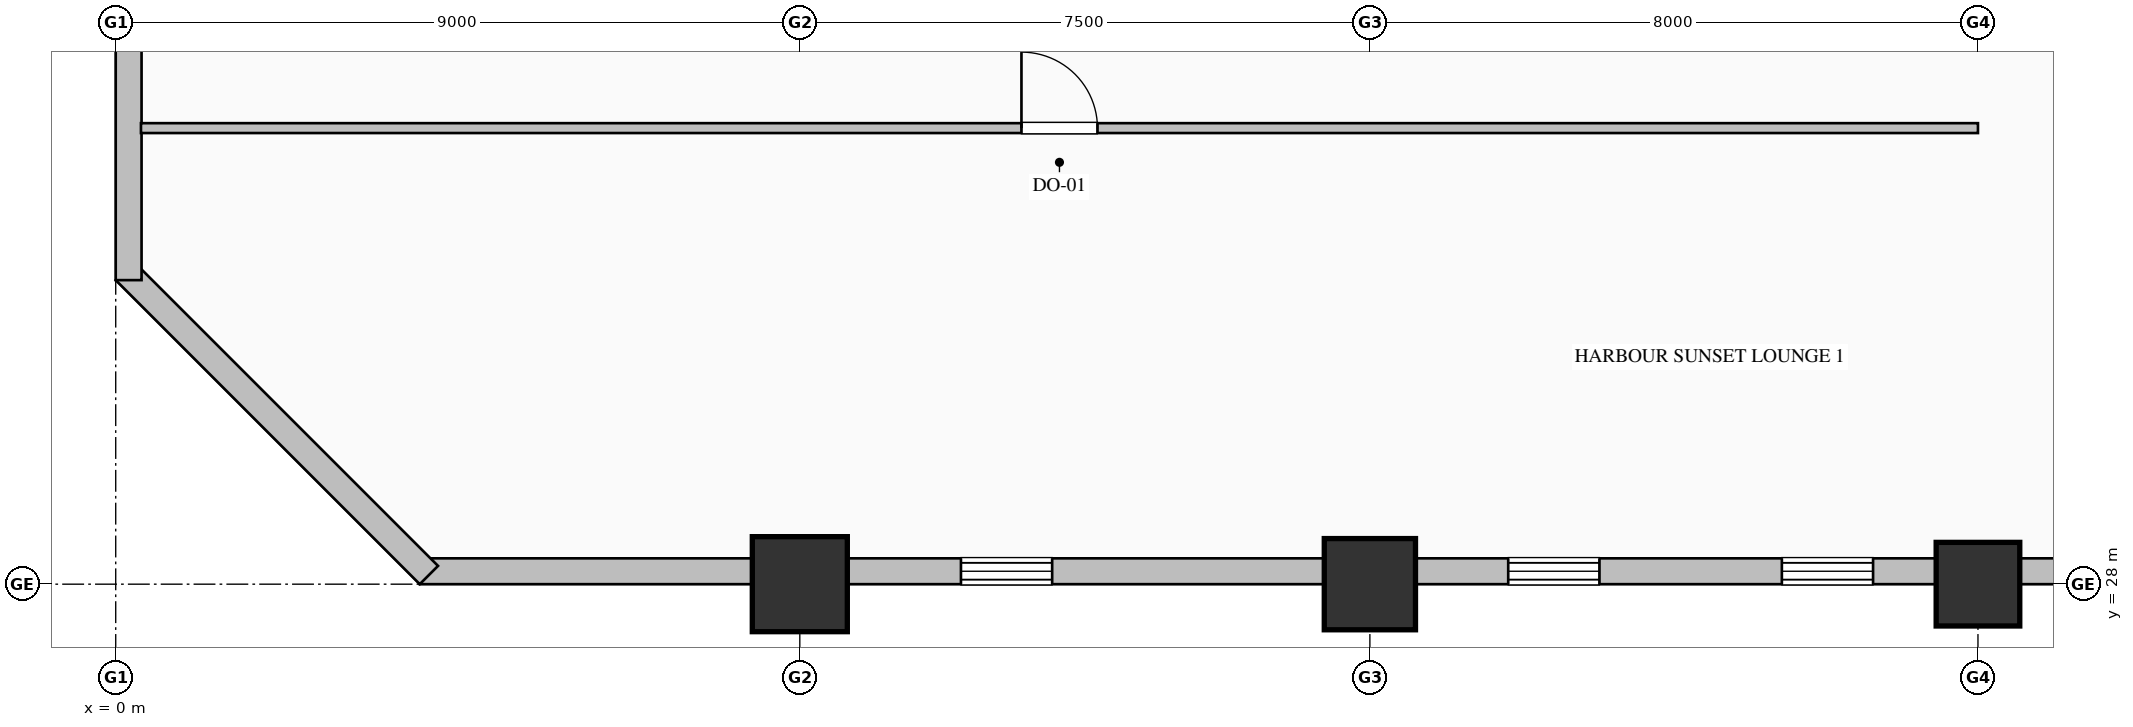
"""IFC4 building model, lengths in metres.
Left out: names, types, materials, properties, quantities, classifications, styles, units other than length and angle.
Written with IfcOpenShell. Run it as: python <this file> out.ifc"""

import sys

from ifc_helpers import new_model, si_unit, direction, frame, frame_2d, origin, origin_2d, place, context, subcontext, project, spatial, rectangle, hollow_rectangle, hollow_circle, extrude, element, fill, save


model = new_model("IFC4")
c1 = context("Model", 3, precision=1e-05, world=origin(), true_north=direction((0.0, 1.0)))
c2 = subcontext(c1, "Body", "Model", "MODEL_VIEW")
j1 = project(units=[si_unit("LENGTHUNIT", "METRE"), si_unit("PLANEANGLEUNIT", "RADIAN")], contexts=[c1])
p1 = place(None, origin())
s1 = spatial("IfcSite", under=j1, at=p1, CompositionType="ELEMENT")
p2 = place(p1, origin())
s2 = spatial("IfcBuilding", under=s1, at=p2, CompositionType="ELEMENT")
p3 = place(p2, frame((0.0, 0.0, 68.2)))
s3 = spatial("IfcBuildingStorey", under=s2, at=p3, CompositionType="ELEMENT", Elevation=68.2)
p4 = place(p3, frame((9.0, 28.0, 0.0), z_axis=(0.0, 0.0, 1.0), x_axis=(1.0, 0.0, 0.0)))
e1 = element("IfcColumn", 1, at=p4, inside=s3, PredefinedType="COLUMN", context=c2, shape_type="SweptSolid", body=[
    extrude(hollow_rectangle(XDim=1.25, YDim=1.25, WallThickness=0.045, at=origin_2d()), origin(), (0.0, 0.0, 1.0), 4.0),
])
p5 = place(p3, frame((16.5, 28.0, 0.0), z_axis=(0.0, 0.0, 1.0), x_axis=(1.0, 0.0, 0.0)))
e2 = element("IfcColumn", 2, at=p5, inside=s3, PredefinedType="COLUMN", context=c2, shape_type="SweptSolid", body=[
    extrude(hollow_circle(Radius=0.6, WallThickness=0.04, at=origin_2d()), origin(), (0.0, 0.0, 1.0), 4.0),
])
p6 = place(p3, frame((24.5, 28.0, 0.0), z_axis=(0.0, 0.0, 1.0), x_axis=(1.0, 0.0, 0.0)))
e3 = element("IfcColumn", 3, at=p6, inside=s3, PredefinedType="COLUMN", context=c2, shape_type="SweptSolid", body=[
    extrude(hollow_rectangle(XDim=1.1, YDim=1.1, WallThickness=0.04, at=origin_2d()), origin(), (0.0, 0.0, 1.0), 4.0),
])
p7 = place(p3, frame((40.52, 28.17, 0.0), z_axis=(0.0, 0.0, 1.0), x_axis=(-1.0, 0.0, 0.0)))
e4 = element("IfcWall", 4, at=p7, inside=s3, PredefinedType="SOLIDWALL", context=c2, shape_type="SweptSolid", body=[
    extrude(rectangle(XDim=36.52, YDim=0.34, at=frame_2d((18.26, 0.0))), origin(), (0.0, 0.0, 1.0), 3.05),
])
p8 = place(p7, frame((3.0, 0.0, 0.7)))
e5 = element("IfcOpeningElement", 5, at=p8, cuts=e4, PredefinedType="OPENING", context=c2, shape_type="SweptSolid", body=[
    extrude(rectangle(XDim=1.2, YDim=1.85, at=frame_2d((0.6, 0.925))), frame((0.0, 0.18, 0.0), z_axis=(0.0, -1.0, 0.0), x_axis=(1.0, 0.0, 0.0)), (0.0, 0.0, 1.0), 0.36),
])
p9 = place(p7, frame((10.2, 0.0, 0.7)))
e6 = element("IfcOpeningElement", 6, at=p9, cuts=e4, PredefinedType="OPENING", context=c2, shape_type="SweptSolid", body=[
    extrude(rectangle(XDim=1.2, YDim=1.85, at=frame_2d((0.6, 0.925))), frame((0.0, 0.18, 0.0), z_axis=(0.0, -1.0, 0.0), x_axis=(1.0, 0.0, 0.0)), (0.0, 0.0, 1.0), 0.36),
])
p10 = place(p7, frame((13.8, 0.0, 0.7)))
e7 = element("IfcOpeningElement", 7, at=p10, cuts=e4, PredefinedType="OPENING", context=c2, shape_type="SweptSolid", body=[
    extrude(rectangle(XDim=1.2, YDim=1.85, at=frame_2d((0.6, 0.925))), frame((0.0, 0.18, 0.0), z_axis=(0.0, -1.0, 0.0), x_axis=(1.0, 0.0, 0.0)), (0.0, 0.0, 1.0), 0.36),
])
p11 = place(p7, frame((17.4, 0.0, 0.7)))
e8 = element("IfcOpeningElement", 8, at=p11, cuts=e4, PredefinedType="OPENING", context=c2, shape_type="SweptSolid", body=[
    extrude(rectangle(XDim=1.2, YDim=1.85, at=frame_2d((0.6, 0.925))), frame((0.0, 0.18, 0.0), z_axis=(0.0, -1.0, 0.0), x_axis=(1.0, 0.0, 0.0)), (0.0, 0.0, 1.0), 0.36),
])
p12 = place(p7, frame((21.0, 0.0, 0.7)))
e9 = element("IfcOpeningElement", 9, at=p12, cuts=e4, PredefinedType="OPENING", context=c2, shape_type="SweptSolid", body=[
    extrude(rectangle(XDim=1.2, YDim=1.85, at=frame_2d((0.6, 0.925))), frame((0.0, 0.18, 0.0), z_axis=(0.0, -1.0, 0.0), x_axis=(1.0, 0.0, 0.0)), (0.0, 0.0, 1.0), 0.36),
])
p13 = place(p7, frame((28.2, 0.0, 0.7)))
e10 = element("IfcOpeningElement", 10, at=p13, cuts=e4, PredefinedType="OPENING", context=c2, shape_type="SweptSolid", body=[
    extrude(rectangle(XDim=1.2, YDim=1.85, at=frame_2d((0.6, 0.925))), frame((0.0, 0.18, 0.0), z_axis=(0.0, -1.0, 0.0), x_axis=(1.0, 0.0, 0.0)), (0.0, 0.0, 1.0), 0.36),
])
p14 = place(p3, frame((4.12, 28.12, 0.0), z_axis=(0.0, 0.0, 1.0), x_axis=(-0.707106781187, 0.707106781187, 0.0)))
e11 = element("IfcWall", 11, at=p14, inside=s3, PredefinedType="SOLIDWALL", context=c2, shape_type="SweptSolid", body=[
    extrude(rectangle(XDim=5.657, YDim=0.34, at=frame_2d((2.828, 0.0))), origin(), (0.0, 0.0, 1.0), 3.75),
])
p15 = place(p3, frame((0.17, 32.0, 0.0), z_axis=(0.0, 0.0, 1.0), x_axis=(0.0, 1.0, 0.0)))
e12 = element("IfcWall", 12, at=p15, inside=s3, PredefinedType="SOLIDWALL", context=c2, shape_type="SweptSolid", body=[
    extrude(rectangle(XDim=16.0, YDim=0.34, at=frame_2d((8.0, 0.0))), origin(), (0.0, 0.0, 1.0), 3.25),
])
p16 = place(p3, frame((0.332, 34.0, 0.0), z_axis=(0.0, 0.0, 1.0), x_axis=(1.0, 0.0, 0.0)))
e13 = element("IfcWall", 13, at=p16, inside=s3, PredefinedType="PARTITIONING", context=c2, shape_type="SweptSolid", body=[
    extrude(rectangle(XDim=24.168, YDim=0.13, at=frame_2d((12.084, 0.0))), origin(), (0.0, 0.0, 1.0), 3.75),
])
p17 = place(p16, frame((11.584, 0.0, 0.0)))
e14 = element("IfcOpeningElement", 14, at=p17, cuts=e13, PredefinedType="OPENING", context=c2, shape_type="SweptSolid", body=[
    extrude(rectangle(XDim=1.0, YDim=2.15, at=frame_2d((0.5, 1.075))), frame((0.0, 0.075, 0.0), z_axis=(0.0, -1.0, 0.0), x_axis=(1.0, 0.0, 0.0)), (0.0, 0.0, 1.0), 0.15),
])
p18 = place(p11, origin())
e15 = element("IfcWindow", 15, at=p18, inside=s3, PartitioningType="DOUBLE_PANEL_VERTICAL", PredefinedType="WINDOW", context=c2, shape_type="SweptSolid", body=[
    extrude(rectangle(XDim=1.2, YDim=1.85, at=frame_2d((0.6, 0.925))), frame((0.0, 0.15, 0.0), z_axis=(0.0, -1.0, 0.0), x_axis=(1.0, 0.0, 0.0)), (0.0, 0.0, 1.0), 0.06),
])
fill(e8, e15)
p19 = place(p12, origin())
e16 = element("IfcWindow", 16, at=p19, inside=s3, PartitioningType="DOUBLE_PANEL_VERTICAL", PredefinedType="WINDOW", context=c2, shape_type="SweptSolid", body=[
    extrude(rectangle(XDim=1.2, YDim=1.85, at=frame_2d((0.6, 0.925))), frame((0.0, 0.15, 0.0), z_axis=(0.0, -1.0, 0.0), x_axis=(1.0, 0.0, 0.0)), (0.0, 0.0, 1.0), 0.06),
])
fill(e9, e16)
p20 = place(p13, origin())
e17 = element("IfcWindow", 17, at=p20, inside=s3, PartitioningType="DOUBLE_PANEL_VERTICAL", PredefinedType="WINDOW", context=c2, shape_type="SweptSolid", body=[
    extrude(rectangle(XDim=1.2, YDim=1.85, at=frame_2d((0.6, 0.925))), frame((0.0, 0.15, 0.0), z_axis=(0.0, -1.0, 0.0), x_axis=(1.0, 0.0, 0.0)), (0.0, 0.0, 1.0), 0.06),
])
fill(e10, e17)
p21 = place(p17, origin())
e18 = element("IfcDoor", 18, at=p21, inside=s3, OperationType="SINGLE_SWING_LEFT", PredefinedType="DOOR", context=c2, shape_type="SweptSolid", body=[
    extrude(rectangle(XDim=1.0, YDim=2.15, at=frame_2d((0.5, 1.075))), frame((0.0, 0.025, 0.0), z_axis=(0.0, -1.0, 0.0), x_axis=(1.0, 0.0, 0.0)), (0.0, 0.0, 1.0), 0.05),
])
fill(e14, e18)
save(model, sys.argv[1])
